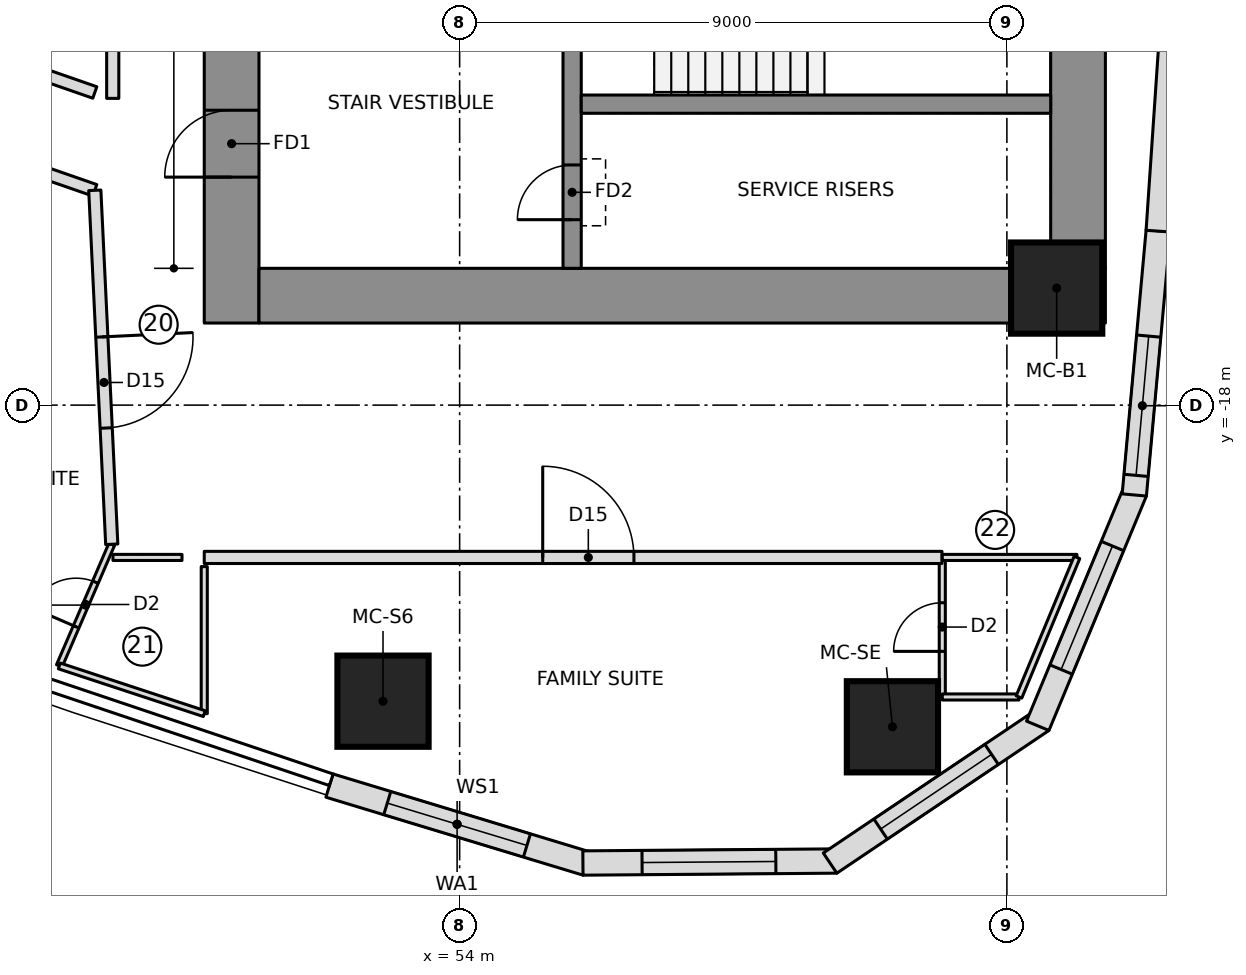
"""IFC4 building model, lengths in metres.
Left out: names, types, materials, properties, quantities, classifications, styles, units other than length and angle.
Written with IfcOpenShell. Run it as: python <this file> out.ifc"""

import sys

from ifc_helpers import new_model, si_unit, direction, frame, frame_2d, origin, origin_2d, place, context, subcontext, project, spatial, polyline, rectangle, outline, extrude, element, fill, save


model = new_model("IFC4")
c1 = context("Model", 3, precision=1e-05, world=origin(), true_north=direction((0.0, 1.0)))
c2 = subcontext(c1, "Body", "Model", "MODEL_VIEW")
j1 = project(units=[si_unit("LENGTHUNIT", "METRE"), si_unit("PLANEANGLEUNIT", "RADIAN")], contexts=[c1])
p1 = place(None, origin())
s1 = spatial("IfcSite", under=j1, at=p1, CompositionType="ELEMENT")
p2 = place(p1, origin())
s2 = spatial("IfcBuilding", under=s1, at=p2, CompositionType="ELEMENT")
p3 = place(p2, frame((0.0, 0.0, 155.05)))
s3 = spatial("IfcBuildingStorey", under=s2, at=p3, CompositionType="ELEMENT", Elevation=155.05)
p4 = place(p3, frame((50.25, -16.65, 0.0), z_axis=(0.0, 0.0, 1.0), x_axis=(0.0, 1.0, 0.0)))
e1 = element("IfcWall", 1, at=p4, inside=s3, PredefinedType="SHEAR", context=c2, shape_type="SweptSolid", body=[
    extrude(rectangle(XDim=10.0, YDim=0.9, at=frame_2d((5.0, 0.0))), origin(), (0.0, 0.0, 1.0), 3.55),
])
p5 = place(p4, frame((2.4, 0.0, 0.0)))
e2 = element("IfcOpeningElement", 2, at=p5, cuts=e1, PredefinedType="OPENING", context=c2, shape_type="SweptSolid", body=[
    extrude(rectangle(XDim=1.1, YDim=2.1, at=frame_2d((0.55, 1.05))), frame((0.0, 0.46, 0.0), z_axis=(0.0, -1.0, 0.0), x_axis=(1.0, 0.0, 0.0)), (0.0, 0.0, 1.0), 0.92),
])
p6 = place(p3, frame((50.7, -16.2, 0.0), z_axis=(0.0, 0.0, 1.0), x_axis=(1.0, 0.0, 0.0)))
e3 = element("IfcWall", 3, at=p6, inside=s3, PredefinedType="SHEAR", context=c2, shape_type="SweptSolid", body=[
    extrude(rectangle(XDim=13.92, YDim=0.9, at=frame_2d((6.96, 0.0))), origin(), (0.0, 0.0, 1.0), 3.55),
])
p7 = place(p3, frame((64.17, -15.75, 0.0), z_axis=(0.0, 0.0, 1.0), x_axis=(0.0, 1.0, 0.0)))
e4 = element("IfcWall", 4, at=p7, inside=s3, PredefinedType="SHEAR", context=c2, shape_type="SweptSolid", body=[
    extrude(rectangle(XDim=7.005, YDim=0.9, at=frame_2d((3.503, 0.0))), origin(), (0.0, 0.0, 1.0), 3.55),
])
p8 = place(p3, frame((55.85, -15.75, 0.0), z_axis=(0.0, 0.0, 1.0), x_axis=(0.0, 1.0, 0.0)))
e5 = element("IfcWall", 5, at=p8, inside=s3, PredefinedType="SHEAR", context=c2, shape_type="SweptSolid", body=[
    extrude(rectangle(XDim=5.4, YDim=0.3, at=frame_2d((2.7, 0.0))), origin(), (0.0, 0.0, 1.0), 3.55),
])
p9 = place(p8, frame((3.6, 0.0, 0.0)))
e6 = element("IfcOpeningElement", 6, at=p9, cuts=e5, PredefinedType="OPENING", context=c2, shape_type="SweptSolid", body=[
    extrude(rectangle(XDim=1.1, YDim=2.1, at=frame_2d((0.55, 1.05))), frame((0.0, 0.16, 0.0), z_axis=(0.0, -1.0, 0.0), x_axis=(1.0, 0.0, 0.0)), (0.0, 0.0, 1.0), 0.32),
])
p10 = place(p8, frame((0.8, 0.0, 0.0)))
e7 = element("IfcOpeningElement", 7, at=p10, cuts=e5, PredefinedType="OPENING", context=c2, shape_type="SweptSolid", body=[
    extrude(rectangle(XDim=0.9, YDim=2.1, at=frame_2d((0.45, 1.05))), frame((0.0, 0.16, 0.0), z_axis=(0.0, -1.0, 0.0), x_axis=(1.0, 0.0, 0.0)), (0.0, 0.0, 1.0), 0.32),
])
p11 = place(p3, frame((56.0, -13.05, 0.0), z_axis=(0.0, 0.0, 1.0), x_axis=(1.0, 0.0, 0.0)))
e8 = element("IfcWall", 8, at=p11, inside=s3, PredefinedType="SHEAR", context=c2, shape_type="SweptSolid", body=[
    extrude(rectangle(XDim=7.72, YDim=0.3, at=frame_2d((3.86, 0.0))), origin(), (0.0, 0.0, 1.0), 3.55),
])
for number, where, z_axis, x_axis in (
    (9, (52.74, -22.869, 0.0), (0.0, 0.0, 1.0), (1.0, 0.0, 0.0)),
    (10, (61.117, -23.291, 0.0), (0.0, 0.0, 1.0), (1.0, 0.0, 0.0)),
    (11, (63.819, -16.075, 0.0), (0.0, 0.0, 1.0), (1.0, 0.0, 0.0)),
):
    element("IfcColumn", number, at=place(p3, frame(where, z_axis=z_axis, x_axis=x_axis)), inside=s3, PredefinedType="COLUMN", context=c2, shape_type="SweptSolid", body=[
        extrude(rectangle(XDim=1.5, YDim=1.5, at=origin_2d()), origin(), (0.0, 0.0, 1.0), 3.55),
    ])
p12 = place(p3, frame((51.859, -24.257, 0.0), z_axis=(0.0, 0.0, 1.0), x_axis=(0.956964488344, -0.290205044837, 0.0)))
e12 = element("IfcWall", 12, at=p12, inside=s3, PredefinedType="NOTDEFINED", context=c2, shape_type="SweptSolid", body=[
    extrude(outline(polyline([(0.0, -0.2), (4.418, -0.2), (4.357, 0.2), (0.0, 0.2), (0.0, -0.2)])), origin(), (0.0, 0.0, 1.0), 3.25),
])
p13 = place(p12, frame((0.994, 0.0, 0.5)))
e13 = element("IfcOpeningElement", 13, at=p13, cuts=e12, PredefinedType="OPENING", context=c2, shape_type="SweptSolid", body=[
    extrude(rectangle(XDim=2.4, YDim=2.0, at=frame_2d((1.2, 1.0))), frame((0.0, 0.21, 0.0), z_axis=(0.0, -1.0, 0.0), x_axis=(1.0, 0.0, 0.0)), (0.0, 0.0, 1.0), 0.42),
])
p14 = place(p3, frame((56.058, -25.531, 0.0), z_axis=(0.0, 0.0, 1.0), x_axis=(0.99996933771, 0.007830941131, 0.0)))
e14 = element("IfcWall", 14, at=p14, inside=s3, PredefinedType="NOTDEFINED", context=c2, shape_type="SweptSolid", body=[
    extrude(outline(polyline([(-0.031, -0.2), (4.145, -0.2), (4.024, 0.2), (0.031, 0.2), (-0.031, -0.2)])), origin(), (0.0, 0.0, 1.0), 3.25),
])
p15 = place(p14, frame((0.942, 0.0, 0.6)))
e15 = element("IfcOpeningElement", 15, at=p15, cuts=e14, PredefinedType="OPENING", context=c2, shape_type="SweptSolid", body=[
    extrude(outline(polyline([(0.0, 1.35), (0.084, 1.771), (0.322, 2.128), (0.679, 2.366), (1.1, 2.45), (1.521, 2.366), (1.878, 2.128), (2.116, 1.771), (2.2, 1.35), (2.2, 1.1), (2.116, 0.679), (1.878, 0.322), (1.521, 0.084), (1.1, 0.0), (0.679, 0.084), (0.322, 0.322), (0.084, 0.679), (0.0, 1.1), (0.0, 1.35)])), frame((0.0, 0.21, 0.0), z_axis=(0.0, -1.0, 0.0), x_axis=(1.0, 0.0, 0.0)), (0.0, 0.0, 1.0), 0.42),
])
p16 = place(p3, frame((60.142, -25.499, 0.0), z_axis=(0.0, 0.0, 1.0), x_axis=(0.829642062482, 0.558295663749, 0.0)))
e16 = element("IfcWall", 16, at=p16, inside=s3, PredefinedType="NOTDEFINED", context=c2, shape_type="SweptSolid", body=[
    extrude(outline(polyline([(-0.06, -0.2), (4.144, -0.2), (4.024, 0.2), (0.06, 0.2), (-0.06, -0.2)])), origin(), (0.0, 0.0, 1.0), 3.25),
])
p17 = place(p16, frame((0.942, 0.0, 0.6)))
e17 = element("IfcOpeningElement", 17, at=p17, cuts=e16, PredefinedType="OPENING", context=c2, shape_type="SweptSolid", body=[
    extrude(outline(polyline([(0.0, 1.35), (0.084, 1.771), (0.322, 2.128), (0.679, 2.366), (1.1, 2.45), (1.521, 2.366), (1.878, 2.128), (2.116, 1.771), (2.2, 1.35), (2.2, 1.1), (2.116, 0.679), (1.878, 0.322), (1.521, 0.084), (1.1, 0.0), (0.679, 0.084), (0.322, 0.322), (0.084, 0.679), (0.0, 1.1), (0.0, 1.35)])), frame((0.0, 0.21, 0.0), z_axis=(0.0, -1.0, 0.0), x_axis=(1.0, 0.0, 0.0)), (0.0, 0.0, 1.0), 0.42),
])
p18 = place(p3, frame((63.53, -23.219, 0.0), z_axis=(0.0, 0.0, 1.0), x_axis=(0.383817293519, 0.923409056267, 0.0)))
e18 = element("IfcWall", 18, at=p18, inside=s3, PredefinedType="NOTDEFINED", context=c2, shape_type="SweptSolid", body=[
    extrude(outline(polyline([(-0.06, -0.2), (4.115, -0.2), (4.054, 0.2), (0.06, 0.2), (-0.06, -0.2)])), origin(), (0.0, 0.0, 1.0), 3.25),
])
p19 = place(p18, frame((0.942, 0.0, 0.6)))
e19 = element("IfcOpeningElement", 19, at=p19, cuts=e18, PredefinedType="OPENING", context=c2, shape_type="SweptSolid", body=[
    extrude(outline(polyline([(0.0, 1.35), (0.084, 1.771), (0.322, 2.128), (0.679, 2.366), (1.1, 2.45), (1.521, 2.366), (1.878, 2.128), (2.116, 1.771), (2.2, 1.35), (2.2, 1.1), (2.116, 0.679), (1.878, 0.322), (1.521, 0.084), (1.1, 0.0), (0.679, 0.084), (0.322, 0.322), (0.084, 0.679), (0.0, 1.1), (0.0, 1.35)])), frame((0.0, 0.21, 0.0), z_axis=(0.0, -1.0, 0.0), x_axis=(1.0, 0.0, 0.0)), (0.0, 0.0, 1.0), 0.42),
])
p20 = place(p3, frame((65.098, -19.447, 0.0), z_axis=(0.0, 0.0, 1.0), x_axis=(0.090296735989, 0.995914905737, 0.0)))
e20 = element("IfcWall", 20, at=p20, inside=s3, PredefinedType="NOTDEFINED", context=c2, shape_type="SweptSolid", body=[
    extrude(outline(polyline([(-0.031, -0.2), (4.331, -0.2), (4.326, 0.2), (0.031, 0.2), (-0.031, -0.2)])), origin(), (0.0, 0.0, 1.0), 3.25),
])
p21 = place(p20, frame((0.293, 0.0, 0.5)))
e21 = element("IfcOpeningElement", 21, at=p21, cuts=e20, PredefinedType="OPENING", context=c2, shape_type="SweptSolid", body=[
    extrude(rectangle(XDim=2.3, YDim=2.0, at=frame_2d((1.15, 1.0))), frame((0.0, 0.21, 0.0), z_axis=(0.0, -1.0, 0.0), x_axis=(1.0, 0.0, 0.0)), (0.0, 0.0, 1.0), 0.42),
])
p22 = place(p3, frame((65.489, -15.136, 0.0), z_axis=(0.0, 0.0, 1.0), x_axis=(0.067731727279, 0.997703569764, 0.0)))
e22 = element("IfcWall", 22, at=p22, inside=s3, PredefinedType="NOTDEFINED", context=c2, shape_type="SweptSolid", body=[
    extrude(outline(polyline([(-0.002, -0.2), (4.331, -0.2), (4.327, 0.2), (0.002, 0.2), (-0.002, -0.2)])), origin(), (0.0, 0.0, 1.0), 3.25),
])
p23 = place(p3, frame((61.938, -22.8, 0.0), z_axis=(0.0, 0.0, 1.0), x_axis=(0.0, 1.0, 0.0)))
e23 = element("IfcWall", 23, at=p23, inside=s3, PredefinedType="PARTITIONING", context=c2, shape_type="SweptSolid", body=[
    extrude(rectangle(XDim=2.3, YDim=0.1, at=frame_2d((1.15, 0.0))), origin(), (0.0, 0.0, 1.0), 3.25),
])
p24 = place(p23, frame((0.75, 0.0, 0.0)))
e24 = element("IfcOpeningElement", 24, at=p24, cuts=e23, PredefinedType="OPENING", context=c2, shape_type="SweptSolid", body=[
    extrude(rectangle(XDim=0.8, YDim=2.1, at=frame_2d((0.4, 1.05))), frame((0.0, 0.06, 0.0), z_axis=(0.0, -1.0, 0.0), x_axis=(1.0, 0.0, 0.0)), (0.0, 0.0, 1.0), 0.12),
])
p25 = place(p3, frame((63.198, -22.8, 0.0), z_axis=(0.0, 0.0, 1.0), x_axis=(-1.0, 0.0, 0.0)))
e25 = element("IfcWall", 25, at=p25, inside=s3, PredefinedType="PARTITIONING", context=c2, shape_type="SweptSolid", body=[
    extrude(rectangle(XDim=1.261, YDim=0.1, at=frame_2d((0.63, 0.0))), origin(), (0.0, 0.0, 1.0), 3.25),
])
p26 = place(p3, frame((47.416, -22.289, 0.0), z_axis=(0.0, 0.0, 1.0), x_axis=(0.396028123143, 0.918238381729, 0.0)))
e26 = element("IfcWall", 26, at=p26, inside=s3, PredefinedType="PARTITIONING", context=c2, shape_type="SweptSolid", body=[
    extrude(rectangle(XDim=2.179, YDim=0.1, at=frame_2d((1.089, 0.0))), origin(), (0.0, 0.0, 1.0), 3.25),
])
p27 = place(p26, frame((0.7, 0.0, 0.0)))
e27 = element("IfcOpeningElement", 27, at=p27, cuts=e26, PredefinedType="OPENING", context=c2, shape_type="SweptSolid", body=[
    extrude(rectangle(XDim=0.8, YDim=2.1, at=frame_2d((0.4, 1.05))), frame((0.0, 0.06, 0.0), z_axis=(0.0, -1.0, 0.0), x_axis=(1.0, 0.0, 0.0)), (0.0, 0.0, 1.0), 0.12),
])
p28 = place(p3, frame((49.8, -20.505, 0.0), z_axis=(0.0, 0.0, 1.0), x_axis=(1.0, 0.0, 0.0)))
e28 = element("IfcWall", 28, at=p28, inside=s3, PredefinedType="PARTITIONING", context=c2, shape_type="SweptSolid", body=[
    extrude(rectangle(XDim=12.133, YDim=0.2, at=frame_2d((6.066, 0.0))), origin(), (0.0, 0.0, 1.0), 3.25),
])
p29 = place(p28, frame((5.566, 0.0, 0.0)))
e29 = element("IfcOpeningElement", 29, at=p29, cuts=e28, PredefinedType="OPENING", context=c2, shape_type="SweptSolid", body=[
    extrude(rectangle(XDim=1.5, YDim=2.1, at=frame_2d((0.75, 1.05))), frame((0.0, 0.11, 0.0), z_axis=(0.0, -1.0, 0.0), x_axis=(1.0, 0.0, 0.0)), (0.0, 0.0, 1.0), 0.22),
])
p30 = place(p3, frame((61.938, -20.505, 0.0), z_axis=(0.0, 0.0, 1.0), x_axis=(1.0, 0.0, 0.0)))
e30 = element("IfcWall", 30, at=p30, inside=s3, PredefinedType="PARTITIONING", context=c2, shape_type="SweptSolid", body=[
    extrude(rectangle(XDim=2.215, YDim=0.1, at=frame_2d((1.107, 0.0))), origin(), (0.0, 0.0, 1.0), 3.25),
])
p31 = place(p3, frame((64.152, -20.505, 0.0), z_axis=(0.0, 0.0, 1.0), x_axis=(-0.383855043906, -0.923393364319, 0.0)))
e31 = element("IfcWall", 31, at=p31, inside=s3, PredefinedType="PARTITIONING", context=c2, shape_type="SweptSolid", body=[
    extrude(rectangle(XDim=2.486, YDim=0.1, at=frame_2d((1.243, 0.0))), origin(), (0.0, 0.0, 1.0), 3.25),
])
p32 = place(p3, frame((48.299, -20.505, 0.0), z_axis=(0.0, 0.0, 1.0), x_axis=(1.0, 0.0, 0.0)))
e32 = element("IfcWall", 32, at=p32, inside=s3, PredefinedType="PARTITIONING", context=c2, shape_type="SweptSolid", body=[
    extrude(rectangle(XDim=1.135, YDim=0.1, at=frame_2d((0.568, 0.0))), origin(), (0.0, 0.0, 1.0), 3.25),
])
p33 = place(p3, frame((49.8, -20.656, 0.0), z_axis=(0.0, 0.0, 1.0), x_axis=(0.0, -1.0, 0.0)))
e33 = element("IfcWall", 33, at=p33, inside=s3, PredefinedType="PARTITIONING", context=c2, shape_type="SweptSolid", body=[
    extrude(rectangle(XDim=2.418, YDim=0.1, at=frame_2d((1.209, 0.0))), origin(), (0.0, 0.0, 1.0), 3.25),
])
p34 = place(p3, frame((49.8, -23.074, 0.0), z_axis=(0.0, 0.0, 1.0), x_axis=(-0.949844078437, 0.312723882455, 0.0)))
e34 = element("IfcWall", 34, at=p34, inside=s3, PredefinedType="PARTITIONING", context=c2, shape_type="SweptSolid", body=[
    extrude(rectangle(XDim=2.51, YDim=0.1, at=frame_2d((1.255, 0.0))), origin(), (0.0, 0.0, 1.0), 3.25),
])
p35 = place(p3, frame((47.012, -14.124, 0.0), z_axis=(0.0, 0.0, 1.0), x_axis=(0.944566081842, -0.32832136244, 0.0)))
e35 = element("IfcWall", 35, at=p35, inside=s3, PredefinedType="PARTITIONING", context=c2, shape_type="SweptSolid", body=[
    extrude(rectangle(XDim=1.045, YDim=0.2, at=frame_2d((0.523, 0.0))), origin(), (0.0, 0.0, 1.0), 3.25),
])
p36 = place(p3, frame((48.0, -12.858, 0.0), z_axis=(0.0, 0.0, 1.0), x_axis=(-0.944517215109, 0.328461916152, 0.0)))
e36 = element("IfcWall", 36, at=p36, inside=s3, PredefinedType="PARTITIONING", context=c2, shape_type="SweptSolid", body=[
    extrude(rectangle(XDim=1.29, YDim=0.2, at=frame_2d((0.645, 0.0))), origin(), (0.0, 0.0, 1.0), 3.25),
])
p37 = place(p3, frame((48.0, -14.467, 0.0), z_axis=(0.0, 0.0, 1.0), x_axis=(0.047837808481, -0.998855116661, 0.0)))
e37 = element("IfcWall", 37, at=p37, inside=s3, PredefinedType="PARTITIONING", context=c2, shape_type="SweptSolid", body=[
    extrude(rectangle(XDim=5.828, YDim=0.2, at=frame_2d((2.914, 0.0))), origin(), (0.0, 0.0, 1.0), 3.25),
])
p38 = place(p37, frame((2.414, 0.0, 0.0)))
e38 = element("IfcOpeningElement", 38, at=p38, cuts=e37, PredefinedType="OPENING", context=c2, shape_type="SweptSolid", body=[
    extrude(rectangle(XDim=1.5, YDim=2.1, at=frame_2d((0.75, 1.05))), frame((0.0, 0.11, 0.0), z_axis=(0.0, -1.0, 0.0), x_axis=(1.0, 0.0, 0.0)), (0.0, 0.0, 1.0), 0.22),
])
p39 = place(p3, frame((48.295, 12.955, 0.0), z_axis=(0.0, 0.0, 1.0), x_axis=(0.0, -1.0, 0.0)))
e39 = element("IfcWall", 39, at=p39, inside=s3, PredefinedType="PARTITIONING", context=c2, shape_type="SweptSolid", body=[
    extrude(rectangle(XDim=25.91, YDim=0.2, at=frame_2d((12.955, 0.0))), origin(), (0.0, 0.0, 1.0), 3.25),
])
p40 = place(p13, origin())
e40 = element("IfcWindow", 40, at=p40, inside=s3, PartitioningType="SINGLE_PANEL", PredefinedType="WINDOW", context=c2, shape_type="SweptSolid", body=[
    extrude(rectangle(XDim=2.4, YDim=2.0, at=frame_2d((1.2, 1.0))), frame((0.0, 0.17, 0.0), z_axis=(0.0, -1.0, 0.0), x_axis=(1.0, 0.0, 0.0)), (0.0, 0.0, 1.0), 0.06),
])
fill(e13, e40)
p41 = place(p15, origin())
e41 = element("IfcWindow", 41, at=p41, inside=s3, PartitioningType="SINGLE_PANEL", PredefinedType="WINDOW", context=c2, shape_type="SweptSolid", body=[
    extrude(outline(polyline([(0.0, 1.35), (0.084, 1.771), (0.322, 2.128), (0.679, 2.366), (1.1, 2.45), (1.521, 2.366), (1.878, 2.128), (2.116, 1.771), (2.2, 1.35), (2.2, 1.1), (2.116, 0.679), (1.878, 0.322), (1.521, 0.084), (1.1, 0.0), (0.679, 0.084), (0.322, 0.322), (0.084, 0.679), (0.0, 1.1), (0.0, 1.35)])), frame((0.0, 0.17, 0.0), z_axis=(0.0, -1.0, 0.0), x_axis=(1.0, 0.0, 0.0)), (0.0, 0.0, 1.0), 0.06),
])
fill(e15, e41)
p42 = place(p17, origin())
e42 = element("IfcWindow", 42, at=p42, inside=s3, PartitioningType="SINGLE_PANEL", PredefinedType="WINDOW", context=c2, shape_type="SweptSolid", body=[
    extrude(outline(polyline([(0.0, 1.35), (0.084, 1.771), (0.322, 2.128), (0.679, 2.366), (1.1, 2.45), (1.521, 2.366), (1.878, 2.128), (2.116, 1.771), (2.2, 1.35), (2.2, 1.1), (2.116, 0.679), (1.878, 0.322), (1.521, 0.084), (1.1, 0.0), (0.679, 0.084), (0.322, 0.322), (0.084, 0.679), (0.0, 1.1), (0.0, 1.35)])), frame((0.0, 0.17, 0.0), z_axis=(0.0, -1.0, 0.0), x_axis=(1.0, 0.0, 0.0)), (0.0, 0.0, 1.0), 0.06),
])
fill(e17, e42)
p43 = place(p19, origin())
e43 = element("IfcWindow", 43, at=p43, inside=s3, PartitioningType="SINGLE_PANEL", PredefinedType="WINDOW", context=c2, shape_type="SweptSolid", body=[
    extrude(outline(polyline([(0.0, 1.35), (0.084, 1.771), (0.322, 2.128), (0.679, 2.366), (1.1, 2.45), (1.521, 2.366), (1.878, 2.128), (2.116, 1.771), (2.2, 1.35), (2.2, 1.1), (2.116, 0.679), (1.878, 0.322), (1.521, 0.084), (1.1, 0.0), (0.679, 0.084), (0.322, 0.322), (0.084, 0.679), (0.0, 1.1), (0.0, 1.35)])), frame((0.0, 0.17, 0.0), z_axis=(0.0, -1.0, 0.0), x_axis=(1.0, 0.0, 0.0)), (0.0, 0.0, 1.0), 0.06),
])
fill(e19, e43)
p44 = place(p21, origin())
e44 = element("IfcWindow", 44, at=p44, inside=s3, PartitioningType="SINGLE_PANEL", PredefinedType="WINDOW", context=c2, shape_type="SweptSolid", body=[
    extrude(rectangle(XDim=2.3, YDim=2.0, at=frame_2d((1.15, 1.0))), frame((0.0, 0.17, 0.0), z_axis=(0.0, -1.0, 0.0), x_axis=(1.0, 0.0, 0.0)), (0.0, 0.0, 1.0), 0.06),
])
fill(e21, e44)
p45 = place(p24, origin())
e45 = element("IfcDoor", 45, at=p45, inside=s3, OperationType="SINGLE_SWING_LEFT", PredefinedType="DOOR", context=c2, shape_type="SweptSolid", body=[
    extrude(rectangle(XDim=0.8, YDim=2.1, at=frame_2d((0.4, 1.05))), frame((0.0, 0.025, 0.0), z_axis=(0.0, -1.0, 0.0), x_axis=(1.0, 0.0, 0.0)), (0.0, 0.0, 1.0), 0.05),
])
fill(e24, e45)
p46 = place(p27, origin())
e46 = element("IfcDoor", 46, at=p46, inside=s3, OperationType="SINGLE_SWING_LEFT", PredefinedType="DOOR", context=c2, shape_type="SweptSolid", body=[
    extrude(rectangle(XDim=0.8, YDim=2.1, at=frame_2d((0.4, 1.05))), frame((0.0, 0.025, 0.0), z_axis=(0.0, -1.0, 0.0), x_axis=(1.0, 0.0, 0.0)), (0.0, 0.0, 1.0), 0.05),
])
fill(e27, e46)
p47 = place(p29, origin())
e47 = element("IfcDoor", 47, at=p47, inside=s3, OperationType="DOUBLE_DOOR_SINGLE_SWING", PredefinedType="DOOR", context=c2, shape_type="SweptSolid", body=[
    extrude(rectangle(XDim=1.5, YDim=2.1, at=frame_2d((0.75, 1.05))), frame((0.0, 0.025, 0.0), z_axis=(0.0, -1.0, 0.0), x_axis=(1.0, 0.0, 0.0)), (0.0, 0.0, 1.0), 0.05),
])
fill(e29, e47)
p48 = place(p38, origin())
e48 = element("IfcDoor", 48, at=p48, inside=s3, OperationType="DOUBLE_DOOR_SINGLE_SWING", PredefinedType="DOOR", context=c2, shape_type="SweptSolid", body=[
    extrude(rectangle(XDim=1.5, YDim=2.1, at=frame_2d((0.75, 1.05))), frame((0.0, 0.025, 0.0), z_axis=(0.0, -1.0, 0.0), x_axis=(1.0, 0.0, 0.0)), (0.0, 0.0, 1.0), 0.05),
])
fill(e38, e48)
p49 = place(p5, origin())
e49 = element("IfcDoor", 49, at=p49, inside=s3, OperationType="SINGLE_SWING_RIGHT", PredefinedType="DOOR", context=c2, shape_type="SweptSolid", body=[
    extrude(rectangle(XDim=1.1, YDim=2.1, at=frame_2d((0.55, 1.05))), frame((0.0, 0.025, 0.0), z_axis=(0.0, -1.0, 0.0), x_axis=(1.0, 0.0, 0.0)), (0.0, 0.0, 1.0), 0.05),
])
fill(e2, e49)
p50 = place(p10, origin())
e50 = element("IfcDoor", 50, at=p50, inside=s3, OperationType="SINGLE_SWING_LEFT", PredefinedType="DOOR", context=c2, shape_type="SweptSolid", body=[
    extrude(rectangle(XDim=0.9, YDim=2.1, at=frame_2d((0.45, 1.05))), frame((0.0, 0.025, 0.0), z_axis=(0.0, -1.0, 0.0), x_axis=(1.0, 0.0, 0.0)), (0.0, 0.0, 1.0), 0.05),
])
fill(e7, e50)
save(model, sys.argv[1])
